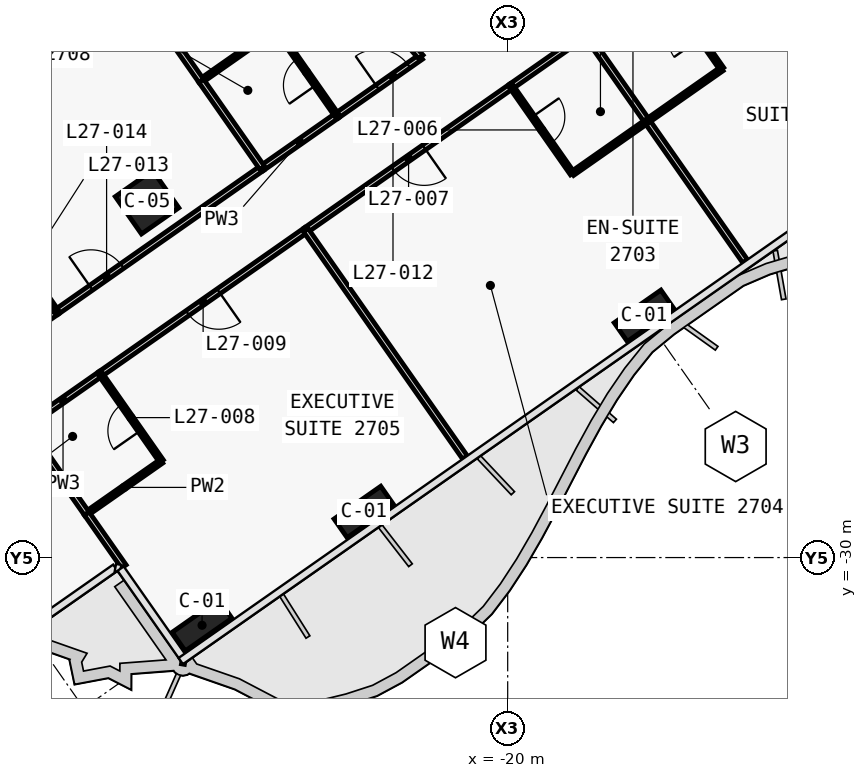
"""IFC4 building model, lengths in metres.
Left out: names, types, materials, properties, quantities, classifications, styles, units other than length and angle.
Written with IfcOpenShell. Run it as: python <this file> out.ifc"""

import sys

from ifc_helpers import new_model, si_unit, direction, frame, frame_2d, origin, origin_2d, place, context, subcontext, project, spatial, rectangle, extrude, element, fill, save


model = new_model("IFC4")
c1 = context("Model", 3, precision=1e-05, world=origin(), true_north=direction((0.0, 1.0)))
c2 = subcontext(c1, "Body", "Model", "MODEL_VIEW")
j1 = project(units=[si_unit("LENGTHUNIT", "METRE"), si_unit("PLANEANGLEUNIT", "RADIAN")], contexts=[c1])
p1 = place(None, origin())
s1 = spatial("IfcSite", under=j1, at=p1, CompositionType="ELEMENT")
p2 = place(p1, origin())
s2 = spatial("IfcBuilding", under=s1, at=p2, CompositionType="ELEMENT")
p3 = place(p2, frame((0.0, 0.0, 122.9)))
s3 = spatial("IfcBuildingStorey", under=s2, at=p3, CompositionType="ELEMENT", Elevation=122.9)
for number, where, z_axis, x_axis in (
    (1, (-16.41, -23.637, 0.0), (0.0, 0.0, 1.0), (-0.819, -0.574, 0.0)),
    (2, (-23.782, -28.799, 0.0), (0.0, 0.0, 1.0), (-0.819, -0.574, 0.0)),
    (3, (-28.042, -31.782, 0.0), (0.0, 0.0, 1.0), (-0.819, -0.574, 0.0)),
):
    element("IfcColumn", number, at=place(p3, frame(where, z_axis=z_axis, x_axis=x_axis)), inside=s3, PredefinedType="COLUMN", context=c2, shape_type="SweptSolid", body=[
        extrude(rectangle(XDim=1.5, YDim=0.6, at=origin_2d()), origin(), (0.0, 0.0, 1.0), 3.6),
    ])
p4 = place(p3, frame((-29.49, -20.649, 0.0), z_axis=(0.0, 0.0, 1.0), x_axis=(-0.819152044289, -0.573576436351, 0.0)))
e4 = element("IfcColumn", 4, at=p4, inside=s3, PredefinedType="COLUMN", context=c2, shape_type="SweptSolid", body=[
    extrude(rectangle(XDim=1.2, YDim=1.2, at=origin_2d()), origin(), (0.0, 0.0, 1.0), 3.6),
])
p5 = place(p3, frame((-24.493, -18.371, 0.0), z_axis=(0.0, 0.0, 1.0), x_axis=(0.819176640776, 0.573541307325, 0.0)))
e5 = element("IfcWall", 5, at=p5, inside=s3, PredefinedType="PARTITIONING", context=c2, shape_type="SweptSolid", body=[
    extrude(rectangle(XDim=2.698, YDim=0.15, at=frame_2d((1.349, 0.0))), origin(), (0.0, 0.0, 1.0), 3.32),
])
p6 = place(p5, frame((1.301, 0.0, 0.0)))
e6 = element("IfcOpeningElement", 6, at=p6, cuts=e5, PredefinedType="OPENING", context=c2, shape_type="SweptSolid", body=[
    extrude(rectangle(XDim=1.0, YDim=2.1, at=frame_2d((0.5, 1.05))), frame((0.0, 0.085, 0.0), z_axis=(0.0, -1.0, 0.0), x_axis=(1.0, 0.0, 0.0)), (0.0, 0.0, 1.0), 0.17),
])
p7 = place(p3, frame((-26.46, -19.748, 0.0), z_axis=(0.0, 0.0, 1.0), x_axis=(0.819179439794, 0.573537309527, 0.0)))
e7 = element("IfcWall", 7, at=p7, inside=s3, PredefinedType="PARTITIONING", context=c2, shape_type="SweptSolid", body=[
    extrude(rectangle(XDim=2.404, YDim=0.15, at=frame_2d((1.202, 0.0))), origin(), (0.0, 0.0, 1.0), 3.32),
])
p8 = place(p3, frame((-31.866, -23.533, 0.0), z_axis=(0.0, 0.0, 1.0), x_axis=(0.819153746897, 0.573574004767, 0.0)))
e8 = element("IfcWall", 8, at=p8, inside=s3, PredefinedType="PARTITIONING", context=c2, shape_type="SweptSolid", body=[
    extrude(rectangle(XDim=6.603, YDim=0.15, at=frame_2d((3.302, 0.0))), origin(), (0.0, 0.0, 1.0), 2.6),
])
p9 = place(p8, frame((1.101, 0.0, 0.0)))
e9 = element("IfcOpeningElement", 9, at=p9, cuts=e8, PredefinedType="OPENING", context=c2, shape_type="SweptSolid", body=[
    extrude(rectangle(XDim=1.0, YDim=2.1, at=frame_2d((0.5, 1.05))), frame((0.0, 0.085, 0.0), z_axis=(0.0, -1.0, 0.0), x_axis=(1.0, 0.0, 0.0)), (0.0, 0.0, 1.0), 0.17),
])
p10 = place(p3, frame((-33.833, -24.91, 0.0), z_axis=(0.0, 0.0, 1.0), x_axis=(0.819146032251, 0.573585022335, 0.0)))
e10 = element("IfcWall", 10, at=p10, inside=s3, PredefinedType="PARTITIONING", context=c2, shape_type="SweptSolid", body=[
    extrude(rectangle(XDim=2.404, YDim=0.15, at=frame_2d((1.202, 0.0))), origin(), (0.0, 0.0, 1.0), 3.32),
])
p11 = place(p3, frame((-19.904, -17.599, 0.0), z_axis=(0.0, 0.0, 1.0), x_axis=(-0.819153746897, -0.573574004767, 0.0)))
e11 = element("IfcWall", 11, at=p11, inside=s3, PredefinedType="PARTITIONING", context=c2, shape_type="SweptSolid", body=[
    extrude(rectangle(XDim=6.603, YDim=0.15, at=frame_2d((3.302, 0.0))), origin(), (0.0, 0.0, 1.0), 2.6),
])
p12 = place(p11, frame((2.801, 0.0, 0.0)))
e12 = element("IfcOpeningElement", 12, at=p12, cuts=e11, PredefinedType="OPENING", context=c2, shape_type="SweptSolid", body=[
    extrude(rectangle(XDim=1.0, YDim=2.1, at=frame_2d((0.5, 1.05))), frame((0.0, 0.085, 0.0), z_axis=(0.0, -1.0, 0.0), x_axis=(1.0, 0.0, 0.0)), (0.0, 0.0, 1.0), 0.17),
])
p13 = place(p3, frame((-17.937, -16.222, 0.0), z_axis=(0.0, 0.0, 1.0), x_axis=(-0.819146032251, -0.573585022335, 0.0)))
e13 = element("IfcWall", 13, at=p13, inside=s3, PredefinedType="PARTITIONING", context=c2, shape_type="SweptSolid", body=[
    extrude(rectangle(XDim=2.404, YDim=0.15, at=frame_2d((1.202, 0.0))), origin(), (0.0, 0.0, 1.0), 3.32),
])
p14 = place(p3, frame((-25.31, -21.384, 0.0), z_axis=(0.0, 0.0, 1.0), x_axis=(-0.819153746897, -0.573574004767, 0.0)))
e14 = element("IfcWall", 14, at=p14, inside=s3, PredefinedType="PARTITIONING", context=c2, shape_type="SweptSolid", body=[
    extrude(rectangle(XDim=6.603, YDim=0.15, at=frame_2d((3.302, 0.0))), origin(), (0.0, 0.0, 1.0), 2.6),
])
p15 = place(p14, frame((2.802, 0.0, 0.0)))
e15 = element("IfcOpeningElement", 15, at=p15, cuts=e14, PredefinedType="OPENING", context=c2, shape_type="SweptSolid", body=[
    extrude(rectangle(XDim=1.0, YDim=2.1, at=frame_2d((0.5, 1.05))), frame((0.0, 0.085, 0.0), z_axis=(0.0, -1.0, 0.0), x_axis=(1.0, 0.0, 0.0)), (0.0, 0.0, 1.0), 0.17),
])
p16 = place(p3, frame((-30.716, -25.17, 0.0), z_axis=(0.0, 0.0, 1.0), x_axis=(-0.819146032251, -0.573585022335, 0.0)))
e16 = element("IfcWall", 16, at=p16, inside=s3, PredefinedType="PARTITIONING", context=c2, shape_type="SweptSolid", body=[
    extrude(rectangle(XDim=2.404, YDim=0.15, at=frame_2d((1.202, 0.0))), origin(), (0.0, 0.0, 1.0), 3.32),
])
p17 = place(p3, frame((-22.284, -16.827, 0.0), z_axis=(0.0, 0.0, 1.0), x_axis=(-0.661545117561, 0.749905365651, 0.0)))
e17 = element("IfcWall", 17, at=p17, inside=s3, PredefinedType="PARTITIONING", context=c2, shape_type="SweptSolid", body=[
    extrude(rectangle(XDim=6.543, YDim=0.15, at=frame_2d((3.271, 0.0))), origin(), (0.0, 0.0, 1.0), 2.6),
])
p18 = place(p3, frame((-26.099, -16.076, 0.0), z_axis=(0.0, 0.0, 1.0), x_axis=(-0.819155442668, -0.573571582932, 0.0)))
e18 = element("IfcWall", 18, at=p18, inside=s3, PredefinedType="PARTITIONING", context=c2, shape_type="SweptSolid", body=[
    extrude(rectangle(XDim=2.4, YDim=0.12, at=frame_2d((1.2, 0.0))), origin(), (0.0, 0.0, 1.0), 3.32),
])
p19 = place(p3, frame((-24.492, -18.37, 0.0), z_axis=(0.0, 0.0, 1.0), x_axis=(-0.573550118428, 0.819170471667, 0.0)))
e19 = element("IfcWall", 19, at=p19, inside=s3, PredefinedType="PARTITIONING", context=c2, shape_type="SweptSolid", body=[
    extrude(rectangle(XDim=2.8, YDim=0.12, at=frame_2d((1.4, 0.0))), origin(), (0.0, 0.0, 1.0), 2.6),
])
p20 = place(p19, frame((0.975, 0.0, 0.0)))
e20 = element("IfcOpeningElement", 20, at=p20, cuts=e19, PredefinedType="OPENING", context=c2, shape_type="SweptSolid", body=[
    extrude(rectangle(XDim=0.85, YDim=2.05, at=frame_2d((0.425, 1.025))), frame((0.0, 0.07, 0.0), z_axis=(0.0, -1.0, 0.0), x_axis=(1.0, 0.0, 0.0)), (0.0, 0.0, 1.0), 0.14),
])
p21 = place(p3, frame((-28.065, -17.453, 0.0), z_axis=(0.0, 0.0, 1.0), x_axis=(-0.573593433868, 0.819140142237, 0.0)))
e21 = element("IfcWall", 21, at=p21, inside=s3, PredefinedType="PARTITIONING", context=c2, shape_type="SweptSolid", body=[
    extrude(rectangle(XDim=8.499, YDim=0.15, at=frame_2d((4.25, 0.0))), origin(), (0.0, 0.0, 1.0), 2.6),
])
p22 = place(p3, frame((-26.458, -19.747, 0.0), z_axis=(0.0, 0.0, 1.0), x_axis=(-0.573550118428, 0.819170471667, 0.0)))
e22 = element("IfcWall", 22, at=p22, inside=s3, PredefinedType="PARTITIONING", context=c2, shape_type="SweptSolid", body=[
    extrude(rectangle(XDim=2.8, YDim=0.15, at=frame_2d((1.4, 0.0))), origin(), (0.0, 0.0, 1.0), 2.6),
])
p23 = place(p3, frame((-31.864, -23.532, 0.0), z_axis=(0.0, 0.0, 1.0), x_axis=(-0.573550118428, 0.819170471667, 0.0)))
e23 = element("IfcWall", 23, at=p23, inside=s3, PredefinedType="PARTITIONING", context=c2, shape_type="SweptSolid", body=[
    extrude(rectangle(XDim=2.8, YDim=0.12, at=frame_2d((1.4, 0.0))), origin(), (0.0, 0.0, 1.0), 2.6),
])
p24 = place(p23, frame((0.975, 0.0, 0.0)))
e24 = element("IfcOpeningElement", 24, at=p24, cuts=e23, PredefinedType="OPENING", context=c2, shape_type="SweptSolid", body=[
    extrude(rectangle(XDim=0.85, YDim=2.05, at=frame_2d((0.425, 1.025))), frame((0.0, 0.07, 0.0), z_axis=(0.0, -1.0, 0.0), x_axis=(1.0, 0.0, 0.0)), (0.0, 0.0, 1.0), 0.14),
])
p25 = place(p3, frame((-9.221, -18.213, 0.0), z_axis=(0.0, 0.0, 1.0), x_axis=(-0.573556251799, 0.819166177294, 0.0)))
e25 = element("IfcWall", 25, at=p25, inside=s3, PredefinedType="PARTITIONING", context=c2, shape_type="SweptSolid", body=[
    extrude(rectangle(XDim=6.63, YDim=0.15, at=frame_2d((3.315, 0.0))), origin(), (0.0, 0.0, 1.0), 2.6),
])
p26 = place(p3, frame((-16.332, -18.518, 0.0), z_axis=(0.0, 0.0, 1.0), x_axis=(0.819155442668, 0.573571582932, 0.0)))
e26 = element("IfcWall", 26, at=p26, inside=s3, PredefinedType="PARTITIONING", context=c2, shape_type="SweptSolid", body=[
    extrude(rectangle(XDim=2.4, YDim=0.12, at=frame_2d((1.2, 0.0))), origin(), (0.0, 0.0, 1.0), 3.32),
])
p27 = place(p3, frame((-14.366, -17.14, 0.0), z_axis=(0.0, 0.0, 1.0), x_axis=(-0.573550118428, 0.819170471667, 0.0)))
e27 = element("IfcWall", 27, at=p27, inside=s3, PredefinedType="PARTITIONING", context=c2, shape_type="SweptSolid", body=[
    extrude(rectangle(XDim=2.8, YDim=0.12, at=frame_2d((1.4, 0.0))), origin(), (0.0, 0.0, 1.0), 3.32),
])
p28 = place(p27, frame((0.975, 0.0, 0.0)))
e28 = element("IfcOpeningElement", 28, at=p28, cuts=e27, PredefinedType="OPENING", context=c2, shape_type="SweptSolid", body=[
    extrude(rectangle(XDim=0.85, YDim=2.05, at=frame_2d((0.425, 1.025))), frame((0.0, 0.07, 0.0), z_axis=(0.0, -1.0, 0.0), x_axis=(1.0, 0.0, 0.0)), (0.0, 0.0, 1.0), 0.14),
])
p29 = place(p3, frame((-13.752, -22.203, 0.0), z_axis=(0.0, 0.0, 1.0), x_axis=(-0.573564311442, 0.819160534108, 0.0)))
e29 = element("IfcWall", 29, at=p29, inside=s3, PredefinedType="PARTITIONING", context=c2, shape_type="SweptSolid", body=[
    extrude(rectangle(XDim=4.499, YDim=0.15, at=frame_2d((2.25, 0.0))), origin(), (0.0, 0.0, 1.0), 2.5),
])
p30 = place(p3, frame((-16.333, -18.517, 0.0), z_axis=(0.0, 0.0, 1.0), x_axis=(-0.573591086599, 0.819141785879, 0.0)))
e30 = element("IfcWall", 30, at=p30, inside=s3, PredefinedType="PARTITIONING", context=c2, shape_type="SweptSolid", body=[
    extrude(rectangle(XDim=2.8, YDim=0.15, at=frame_2d((1.4, 0.0))), origin(), (0.0, 0.0, 1.0), 3.32),
])
p31 = place(p3, frame((-19.906, -17.6, 0.0), z_axis=(0.0, 0.0, 1.0), x_axis=(0.573550118428, -0.819170471667, 0.0)))
e31 = element("IfcWall", 31, at=p31, inside=s3, PredefinedType="PARTITIONING", context=c2, shape_type="SweptSolid", body=[
    extrude(rectangle(XDim=2.8, YDim=0.12, at=frame_2d((1.4, 0.0))), origin(), (0.0, 0.0, 1.0), 3.32),
])
p32 = place(p31, frame((0.975, 0.0, 0.0)))
e32 = element("IfcOpeningElement", 32, at=p32, cuts=e31, PredefinedType="OPENING", context=c2, shape_type="SweptSolid", body=[
    extrude(rectangle(XDim=0.85, YDim=2.05, at=frame_2d((0.425, 1.025))), frame((0.0, 0.07, 0.0), z_axis=(0.0, -1.0, 0.0), x_axis=(1.0, 0.0, 0.0)), (0.0, 0.0, 1.0), 0.14),
])
p33 = place(p3, frame((-18.298, -19.894, 0.0), z_axis=(0.0, 0.0, 1.0), x_axis=(0.819141114317, 0.573592045652, 0.0)))
e33 = element("IfcWall", 33, at=p33, inside=s3, PredefinedType="PARTITIONING", context=c2, shape_type="SweptSolid", body=[
    extrude(rectangle(XDim=2.4, YDim=0.12, at=frame_2d((1.2, 0.0))), origin(), (0.0, 0.0, 1.0), 3.32),
])
p34 = place(p3, frame((-21.124, -27.365, 0.0), z_axis=(0.0, 0.0, 1.0), x_axis=(-0.573572324301, 0.819154923562, 0.0)))
e34 = element("IfcWall", 34, at=p34, inside=s3, PredefinedType="PARTITIONING", context=c2, shape_type="SweptSolid", body=[
    extrude(rectangle(XDim=7.3, YDim=0.15, at=frame_2d((3.65, 0.0))), origin(), (0.0, 0.0, 1.0), 2.5),
])
p35 = place(p3, frame((-31.077, -28.842, 0.0), z_axis=(0.0, 0.0, 1.0), x_axis=(0.819188907105, 0.573523787192, 0.0)))
e35 = element("IfcWall", 35, at=p35, inside=s3, PredefinedType="PARTITIONING", context=c2, shape_type="SweptSolid", body=[
    extrude(rectangle(XDim=2.4, YDim=0.12, at=frame_2d((1.2, 0.0))), origin(), (0.0, 0.0, 1.0), 3.32),
])
p36 = place(p3, frame((-29.111, -27.464, 0.0), z_axis=(0.0, 0.0, 1.0), x_axis=(-0.573550118428, 0.819170471667, 0.0)))
e36 = element("IfcWall", 36, at=p36, inside=s3, PredefinedType="PARTITIONING", context=c2, shape_type="SweptSolid", body=[
    extrude(rectangle(XDim=2.8, YDim=0.12, at=frame_2d((1.4, 0.0))), origin(), (0.0, 0.0, 1.0), 3.32),
])
p37 = place(p36, frame((0.975, 0.0, 0.0)))
e37 = element("IfcOpeningElement", 37, at=p37, cuts=e36, PredefinedType="OPENING", context=c2, shape_type="SweptSolid", body=[
    extrude(rectangle(XDim=0.85, YDim=2.05, at=frame_2d((0.425, 1.025))), frame((0.0, 0.07, 0.0), z_axis=(0.0, -1.0, 0.0), x_axis=(1.0, 0.0, 0.0)), (0.0, 0.0, 1.0), 0.14),
])
p38 = place(p3, frame((-30.101, -30.236, 0.0), z_axis=(0.0, 0.0, 1.0), x_axis=(-0.573597175316, 0.819137522318, 0.0)))
e38 = element("IfcWall", 38, at=p38, inside=s3, PredefinedType="PARTITIONING", context=c2, shape_type="SweptSolid", body=[
    extrude(rectangle(XDim=1.701, YDim=0.15, at=frame_2d((0.851, 0.0))), origin(), (0.0, 0.0, 1.0), 3.32),
])
p39 = place(p3, frame((-31.078, -28.841, 0.0), z_axis=(0.0, 0.0, 1.0), x_axis=(-0.573550118428, 0.819170471667, 0.0)))
e39 = element("IfcWall", 39, at=p39, inside=s3, PredefinedType="PARTITIONING", context=c2, shape_type="SweptSolid", body=[
    extrude(rectangle(XDim=2.8, YDim=0.15, at=frame_2d((1.4, 0.0))), origin(), (0.0, 0.0, 1.0), 3.32),
])
p40 = place(p32, origin())
e40 = element("IfcDoor", 40, at=p40, inside=s3, OperationType="SINGLE_SWING_RIGHT", PredefinedType="DOOR", context=c2, shape_type="SweptSolid", body=[
    extrude(rectangle(XDim=0.85, YDim=2.05, at=frame_2d((0.425, 1.025))), frame((0.0, 0.025, 0.0), z_axis=(0.0, -1.0, 0.0), x_axis=(1.0, 0.0, 0.0)), (0.0, 0.0, 1.0), 0.05),
])
fill(e32, e40)
p41 = place(p12, origin())
e41 = element("IfcDoor", 41, at=p41, inside=s3, OperationType="SINGLE_SWING_RIGHT", PredefinedType="DOOR", context=c2, shape_type="SweptSolid", body=[
    extrude(rectangle(XDim=1.0, YDim=2.1, at=frame_2d((0.5, 1.05))), frame((0.0, 0.025, 0.0), z_axis=(0.0, -1.0, 0.0), x_axis=(1.0, 0.0, 0.0)), (0.0, 0.0, 1.0), 0.05),
])
fill(e12, e41)
p42 = place(p37, origin())
e42 = element("IfcDoor", 42, at=p42, inside=s3, OperationType="SINGLE_SWING_RIGHT", PredefinedType="DOOR", context=c2, shape_type="SweptSolid", body=[
    extrude(rectangle(XDim=0.85, YDim=2.05, at=frame_2d((0.425, 1.025))), frame((0.0, 0.025, 0.0), z_axis=(0.0, -1.0, 0.0), x_axis=(1.0, 0.0, 0.0)), (0.0, 0.0, 1.0), 0.05),
])
fill(e37, e42)
p43 = place(p15, origin())
e43 = element("IfcDoor", 43, at=p43, inside=s3, OperationType="SINGLE_SWING_RIGHT", PredefinedType="DOOR", context=c2, shape_type="SweptSolid", body=[
    extrude(rectangle(XDim=1.0, YDim=2.1, at=frame_2d((0.5, 1.05))), frame((0.0, 0.025, 0.0), z_axis=(0.0, -1.0, 0.0), x_axis=(1.0, 0.0, 0.0)), (0.0, 0.0, 1.0), 0.05),
])
fill(e15, e43)
p44 = place(p20, origin())
e44 = element("IfcDoor", 44, at=p44, inside=s3, OperationType="SINGLE_SWING_LEFT", PredefinedType="DOOR", context=c2, shape_type="SweptSolid", body=[
    extrude(rectangle(XDim=0.85, YDim=2.05, at=frame_2d((0.425, 1.025))), frame((0.0, 0.025, 0.0), z_axis=(0.0, -1.0, 0.0), x_axis=(1.0, 0.0, 0.0)), (0.0, 0.0, 1.0), 0.05),
])
fill(e20, e44)
p45 = place(p6, origin())
e45 = element("IfcDoor", 45, at=p45, inside=s3, OperationType="SINGLE_SWING_RIGHT", PredefinedType="DOOR", context=c2, shape_type="SweptSolid", body=[
    extrude(rectangle(XDim=1.0, YDim=2.1, at=frame_2d((0.5, 1.05))), frame((0.0, 0.025, 0.0), z_axis=(0.0, -1.0, 0.0), x_axis=(1.0, 0.0, 0.0)), (0.0, 0.0, 1.0), 0.05),
])
fill(e6, e45)
p46 = place(p9, origin())
e46 = element("IfcDoor", 46, at=p46, inside=s3, OperationType="SINGLE_SWING_RIGHT", PredefinedType="DOOR", context=c2, shape_type="SweptSolid", body=[
    extrude(rectangle(XDim=1.0, YDim=2.1, at=frame_2d((0.5, 1.05))), frame((0.0, 0.025, 0.0), z_axis=(0.0, -1.0, 0.0), x_axis=(1.0, 0.0, 0.0)), (0.0, 0.0, 1.0), 0.05),
])
fill(e9, e46)
save(model, sys.argv[1])
